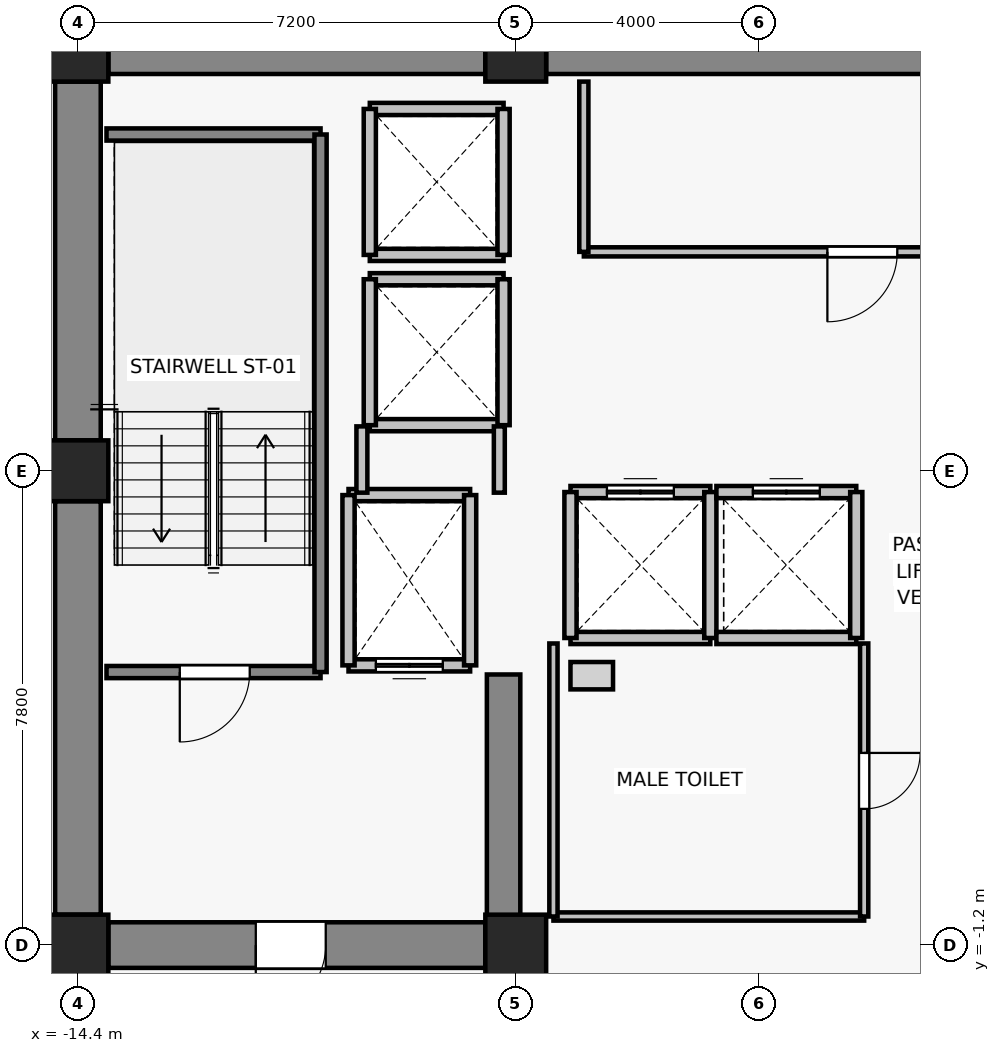
"""IFC4 building model, lengths in metres.
Left out: names, types, materials, properties, quantities, classifications, styles, units other than length and angle.
Written with IfcOpenShell. Run it as: python <this file> out.ifc"""

import sys

from ifc_helpers import new_model, si_unit, direction, frame, frame_2d, origin, origin_2d, place, context, subcontext, project, spatial, rectangle, extrude, source, transform, mapped, element, fill, save


model = new_model("IFC4")
c1 = context("Model", 3, precision=1e-05, world=origin(), true_north=direction((0.0, 1.0)))
c2 = subcontext(c1, "Body", "Model", "MODEL_VIEW")
j1 = project(units=[si_unit("LENGTHUNIT", "METRE"), si_unit("PLANEANGLEUNIT", "RADIAN")], contexts=[c1])
p1 = place(None, origin())
s1 = spatial("IfcSite", under=j1, at=p1, CompositionType="ELEMENT")
p2 = place(p1, origin())
s2 = spatial("IfcBuilding", under=s1, at=p2, CompositionType="ELEMENT")
p3 = place(p2, frame((0.0, 0.0, 169.3)))
s3 = spatial("IfcBuildingStorey", under=s2, at=p3, CompositionType="ELEMENT", Elevation=169.3)
for number, where, z_axis, x_axis in (
    (1, (-14.4, -1.2, 0.0), (0.0, 0.0, 1.0), (1.0, 0.0, 0.0)),
    (2, (-7.2, -1.2, 0.0), (0.0, 0.0, 1.0), (1.0, 0.0, 0.0)),
    (3, (-14.4, 6.6, 0.0), (0.0, 0.0, 1.0), (1.0, 0.0, 0.0)),
    (4, (-14.4, 13.5, 0.0), (0.0, 0.0, 1.0), (1.0, 0.0, 0.0)),
    (5, (-7.2, 13.5, 0.0), (0.0, 0.0, 1.0), (1.0, 0.0, 0.0)),
):
    element("IfcColumn", number, at=place(p3, frame(where, z_axis=z_axis, x_axis=x_axis)), inside=s3, PredefinedType="COLUMN", context=c2, shape_type="SweptSolid", body=[
        extrude(rectangle(XDim=1.0, YDim=1.0, at=origin_2d()), origin(), (0.0, 0.0, 1.0), 3.3),
    ])
p4 = place(p3, frame((-13.9, 13.5, 0.0), z_axis=(0.0, 0.0, 1.0), x_axis=(1.0, 0.0, 0.0)))
e6 = element("IfcWall", 6, at=p4, inside=s3, PredefinedType="SHEAR", context=c2, shape_type="SweptSolid", body=[
    extrude(rectangle(XDim=6.2, YDim=0.75, at=frame_2d((3.1, 0.0))), origin(), (0.0, 0.0, 1.0), 3.075),
])
p5 = place(p3, frame((-6.7, 13.5, 0.0), z_axis=(0.0, 0.0, 1.0), x_axis=(1.0, 0.0, 0.0)))
e7 = element("IfcWall", 7, at=p5, inside=s3, PredefinedType="SHEAR", context=c2, shape_type="SweptSolid", body=[
    extrude(rectangle(XDim=13.4, YDim=0.75, at=frame_2d((6.7, 0.0))), origin(), (0.0, 0.0, 1.0), 3.075),
])
p6 = place(p3, frame((-14.4, -0.7, 0.0), z_axis=(0.0, 0.0, 1.0), x_axis=(0.0, 1.0, 0.0)))
e8 = element("IfcWall", 8, at=p6, inside=s3, PredefinedType="SHEAR", context=c2, shape_type="SweptSolid", body=[
    extrude(rectangle(XDim=6.8, YDim=0.75, at=frame_2d((3.4, 0.0))), origin(), (0.0, 0.0, 1.0), 3.075),
])
p7 = place(p3, frame((-14.4, 7.1, 0.0), z_axis=(0.0, 0.0, 1.0), x_axis=(0.0, 1.0, 0.0)))
e9 = element("IfcWall", 9, at=p7, inside=s3, PredefinedType="SHEAR", context=c2, shape_type="SweptSolid", body=[
    extrude(rectangle(XDim=5.9, YDim=0.75, at=frame_2d((2.95, 0.0))), origin(), (0.0, 0.0, 1.0), 3.075),
])
p8 = place(p3, frame((-7.7, -1.2, 0.0), z_axis=(0.0, 0.0, 1.0), x_axis=(-1.0, 0.0, 0.0)))
e10 = element("IfcWall", 10, at=p8, inside=s3, PredefinedType="SHEAR", context=c2, shape_type="SweptSolid", body=[
    extrude(rectangle(XDim=6.2, YDim=0.75, at=frame_2d((3.1, 0.0))), origin(), (0.0, 0.0, 1.0), 3.075),
])
p9 = place(p8, frame((2.625, 0.0, 0.0)))
e11 = element("IfcOpeningElement", 11, at=p9, cuts=e10, PredefinedType="OPENING", context=c2, shape_type="SweptSolid", body=[
    extrude(rectangle(XDim=1.15, YDim=2.15, at=frame_2d((0.575, 1.075))), frame((0.0, 0.385, 0.0), z_axis=(0.0, -1.0, 0.0), x_axis=(1.0, 0.0, 0.0)), (0.0, 0.0, 1.0), 0.77),
])
p10 = place(p3, frame((-7.4, -0.825, 0.0), z_axis=(0.0, 0.0, 1.0), x_axis=(0.0, 1.0, 0.0)))
e12 = element("IfcWall", 12, at=p10, inside=s3, PredefinedType="SHEAR", context=c2, shape_type="SweptSolid", body=[
    extrude(rectangle(XDim=4.075, YDim=0.55, at=frame_2d((2.038, 0.0))), origin(), (0.0, 0.0, 1.0), 3.075),
])
p11 = place(p3, frame((-7.95, 3.4, 0.0), z_axis=(0.0, 0.0, 1.0), x_axis=(-1.0, 0.0, 0.0)))
e13 = element("IfcWall", 13, at=p11, inside=s3, PredefinedType="SOLIDWALL", context=c2, shape_type="SweptSolid", body=[
    extrude(rectangle(XDim=2.0, YDim=0.2, at=frame_2d((1.0, 0.0))), origin(), (0.0, 0.0, 1.0), 3.075),
])
p12 = place(p11, frame((0.45, 0.0, 0.0)))
e14 = element("IfcOpeningElement", 14, at=p12, cuts=e13, PredefinedType="OPENING", context=c2, shape_type="SweptSolid", body=[
    extrude(rectangle(XDim=1.1, YDim=2.2, at=frame_2d((0.55, 1.1))), frame((0.0, 0.11, 0.0), z_axis=(0.0, -1.0, 0.0), x_axis=(1.0, 0.0, 0.0)), (0.0, 0.0, 1.0), 0.22),
])
p13 = place(p3, frame((-9.95, 6.2, 0.0), z_axis=(0.0, 0.0, 1.0), x_axis=(1.0, 0.0, 0.0)))
e15 = element("IfcWall", 15, at=p13, inside=s3, PredefinedType="SOLIDWALL", context=c2, shape_type="SweptSolid", body=[
    extrude(rectangle(XDim=2.0, YDim=0.2, at=frame_2d((1.0, 0.0))), origin(), (0.0, 0.0, 1.0), 3.075),
])
for number, where, z_axis, x_axis in (
    (16, (-9.95, 3.4, 0.0), (0.0, 0.0, 1.0), (0.0, 1.0, 0.0)),
    (17, (-7.95, 6.2, 0.0), (0.0, 0.0, 1.0), (0.0, -1.0, 0.0)),
):
    element("IfcWall", number, at=place(p3, frame(where, z_axis=z_axis, x_axis=x_axis)), inside=s3, PredefinedType="SOLIDWALL", context=c2, shape_type="SweptSolid", body=[
        extrude(rectangle(XDim=2.8, YDim=0.2, at=frame_2d((1.4, 0.0))), origin(), (0.0, 0.0, 1.0), 3.075),
    ])
p14 = place(p3, frame((-4.0, 3.85, 0.0), z_axis=(0.0, 0.0, 1.0), x_axis=(-1.0, 0.0, 0.0)))
e18 = element("IfcWall", 18, at=p14, inside=s3, PredefinedType="SOLIDWALL", context=c2, shape_type="SweptSolid", body=[
    extrude(rectangle(XDim=2.3, YDim=0.2, at=frame_2d((1.15, 0.0))), origin(), (0.0, 0.0, 1.0), 3.075),
])
p15 = place(p3, frame((-6.3, 6.25, 0.0), z_axis=(0.0, 0.0, 1.0), x_axis=(1.0, 0.0, 0.0)))
e19 = element("IfcWall", 19, at=p15, inside=s3, PredefinedType="SOLIDWALL", context=c2, shape_type="SweptSolid", body=[
    extrude(rectangle(XDim=2.3, YDim=0.2, at=frame_2d((1.15, 0.0))), origin(), (0.0, 0.0, 1.0), 3.075),
])
p16 = place(p15, frame((0.6, 0.0, 0.0)))
e20 = element("IfcOpeningElement", 20, at=p16, cuts=e19, PredefinedType="OPENING", context=c2, shape_type="SweptSolid", body=[
    extrude(rectangle(XDim=1.1, YDim=2.2, at=frame_2d((0.55, 1.1))), frame((0.0, 0.11, 0.0), z_axis=(0.0, -1.0, 0.0), x_axis=(1.0, 0.0, 0.0)), (0.0, 0.0, 1.0), 0.22),
])
for number, where, z_axis, x_axis in (
    (21, (-6.3, 3.85, 0.0), (0.0, 0.0, 1.0), (0.0, 1.0, 0.0)),
    (22, (-4.0, 6.25, 0.0), (0.0, 0.0, 1.0), (0.0, -1.0, 0.0)),
):
    element("IfcWall", number, at=place(p3, frame(where, z_axis=z_axis, x_axis=x_axis)), inside=s3, PredefinedType="SOLIDWALL", context=c2, shape_type="SweptSolid", body=[
        extrude(rectangle(XDim=2.4, YDim=0.2, at=frame_2d((1.2, 0.0))), origin(), (0.0, 0.0, 1.0), 3.075),
    ])
p17 = place(p3, frame((-1.6, 3.85, 0.0), z_axis=(0.0, 0.0, 1.0), x_axis=(-1.0, 0.0, 0.0)))
e23 = element("IfcWall", 23, at=p17, inside=s3, PredefinedType="SOLIDWALL", context=c2, shape_type="SweptSolid", body=[
    extrude(rectangle(XDim=2.3, YDim=0.2, at=frame_2d((1.15, 0.0))), origin(), (0.0, 0.0, 1.0), 3.075),
])
p18 = place(p3, frame((-3.9, 6.25, 0.0), z_axis=(0.0, 0.0, 1.0), x_axis=(1.0, 0.0, 0.0)))
e24 = element("IfcWall", 24, at=p18, inside=s3, PredefinedType="SOLIDWALL", context=c2, shape_type="SweptSolid", body=[
    extrude(rectangle(XDim=2.3, YDim=0.2, at=frame_2d((1.15, 0.0))), origin(), (0.0, 0.0, 1.0), 3.075),
])
p19 = place(p18, frame((0.6, 0.0, 0.0)))
e25 = element("IfcOpeningElement", 25, at=p19, cuts=e24, PredefinedType="OPENING", context=c2, shape_type="SweptSolid", body=[
    extrude(rectangle(XDim=1.1, YDim=2.2, at=frame_2d((0.55, 1.1))), frame((0.0, 0.11, 0.0), z_axis=(0.0, -1.0, 0.0), x_axis=(1.0, 0.0, 0.0)), (0.0, 0.0, 1.0), 0.22),
])
p20 = place(p3, frame((-1.6, 6.25, 0.0), z_axis=(0.0, 0.0, 1.0), x_axis=(0.0, -1.0, 0.0)))
e26 = element("IfcWall", 26, at=p20, inside=s3, PredefinedType="SOLIDWALL", context=c2, shape_type="SweptSolid", body=[
    extrude(rectangle(XDim=2.4, YDim=0.2, at=frame_2d((1.2, 0.0))), origin(), (0.0, 0.0, 1.0), 3.075),
])
for number, where, z_axis, x_axis in (
    (27, (-7.4, 7.35, 0.0), (0.0, 0.0, 1.0), (-1.0, 0.0, 0.0)),
    (28, (-9.6, 9.75, 0.0), (0.0, 0.0, 1.0), (1.0, 0.0, 0.0)),
):
    element("IfcWall", number, at=place(p3, frame(where, z_axis=z_axis, x_axis=x_axis)), inside=s3, PredefinedType="SOLIDWALL", context=c2, shape_type="SweptSolid", body=[
        extrude(rectangle(XDim=2.2, YDim=0.2, at=frame_2d((1.1, 0.0))), origin(), (0.0, 0.0, 1.0), 2.565),
    ])
p21 = place(p3, frame((-9.6, 7.35, 0.0), z_axis=(0.0, 0.0, 1.0), x_axis=(0.0, 1.0, 0.0)))
e29 = element("IfcWall", 29, at=p21, inside=s3, PredefinedType="SOLIDWALL", context=c2, shape_type="SweptSolid", body=[
    extrude(rectangle(XDim=2.4, YDim=0.2, at=frame_2d((1.2, 0.0))), origin(), (0.0, 0.0, 1.0), 3.075),
])
p22 = place(p3, frame((-7.4, 9.75, 0.0), z_axis=(0.0, 0.0, 1.0), x_axis=(0.0, -1.0, 0.0)))
e30 = element("IfcWall", 30, at=p22, inside=s3, PredefinedType="SOLIDWALL", context=c2, shape_type="SweptSolid", body=[
    extrude(rectangle(XDim=2.4, YDim=0.2, at=frame_2d((1.2, 0.0))), origin(), (0.0, 0.0, 1.0), 2.565),
])
for number, where, z_axis, x_axis in (
    (31, (-7.4, 10.15, 0.0), (0.0, 0.0, 1.0), (-1.0, 0.0, 0.0)),
    (32, (-9.6, 12.55, 0.0), (0.0, 0.0, 1.0), (1.0, 0.0, 0.0)),
):
    element("IfcWall", number, at=place(p3, frame(where, z_axis=z_axis, x_axis=x_axis)), inside=s3, PredefinedType="SOLIDWALL", context=c2, shape_type="SweptSolid", body=[
        extrude(rectangle(XDim=2.2, YDim=0.2, at=frame_2d((1.1, 0.0))), origin(), (0.0, 0.0, 1.0), 2.565),
    ])
p23 = place(p3, frame((-9.6, 10.15, 0.0), z_axis=(0.0, 0.0, 1.0), x_axis=(0.0, 1.0, 0.0)))
e33 = element("IfcWall", 33, at=p23, inside=s3, PredefinedType="SOLIDWALL", context=c2, shape_type="SweptSolid", body=[
    extrude(rectangle(XDim=2.4, YDim=0.2, at=frame_2d((1.2, 0.0))), origin(), (0.0, 0.0, 1.0), 3.075),
])
p24 = place(p3, frame((-7.4, 12.55, 0.0), z_axis=(0.0, 0.0, 1.0), x_axis=(0.0, -1.0, 0.0)))
e34 = element("IfcWall", 34, at=p24, inside=s3, PredefinedType="SOLIDWALL", context=c2, shape_type="SweptSolid", body=[
    extrude(rectangle(XDim=2.4, YDim=0.2, at=frame_2d((1.2, 0.0))), origin(), (0.0, 0.0, 1.0), 2.565),
])
p25 = place(p3, frame((-10.41, 3.29, 0.0), z_axis=(0.0, 0.0, 1.0), x_axis=(-1.0, 0.0, 0.0)))
e35 = element("IfcWall", 35, at=p25, inside=s3, PredefinedType="SOLIDWALL", context=c2, shape_type="SweptSolid", body=[
    extrude(rectangle(XDim=3.52, YDim=0.2, at=frame_2d((1.76, 0.0))), origin(), (0.0, 0.0, 1.0), 3.075),
])
p26 = place(p25, frame((1.165, 0.0, 0.0)))
e36 = element("IfcOpeningElement", 36, at=p26, cuts=e35, PredefinedType="OPENING", context=c2, shape_type="SweptSolid", body=[
    extrude(rectangle(XDim=1.15, YDim=2.15, at=frame_2d((0.575, 1.075))), frame((0.0, 0.11, 0.0), z_axis=(0.0, -1.0, 0.0), x_axis=(1.0, 0.0, 0.0)), (0.0, 0.0, 1.0), 0.22),
])
p27 = place(p3, frame((-13.93, 12.13, 0.0), z_axis=(0.0, 0.0, 1.0), x_axis=(1.0, 0.0, 0.0)))
e37 = element("IfcWall", 37, at=p27, inside=s3, PredefinedType="SOLIDWALL", context=c2, shape_type="SweptSolid", body=[
    extrude(rectangle(XDim=3.52, YDim=0.2, at=frame_2d((1.76, 0.0))), origin(), (0.0, 0.0, 1.0), 3.075),
])
p28 = place(p3, frame((-10.41, 12.13, 0.0), z_axis=(0.0, 0.0, 1.0), x_axis=(0.0, -1.0, 0.0)))
e38 = element("IfcWall", 38, at=p28, inside=s3, PredefinedType="SOLIDWALL", context=c2, shape_type="SweptSolid", body=[
    extrude(rectangle(XDim=8.84, YDim=0.2, at=frame_2d((4.42, 0.0))), origin(), (0.0, 0.0, 1.0), 3.075),
])
p29 = place(p3, frame((-9.73, 6.24, 0.0), z_axis=(0.0, 0.0, 1.0), x_axis=(0.0, 1.0, 0.0)))
e39 = element("IfcWall", 39, at=p29, inside=s3, PredefinedType="PARTITIONING", context=c2, shape_type="SweptSolid", body=[
    extrude(rectangle(XDim=1.09, YDim=0.18, at=frame_2d((0.545, 0.0))), origin(), (0.0, 0.0, 1.0), 3.075),
])
p30 = place(p3, frame((-7.47, 7.33, 0.0), z_axis=(0.0, 0.0, 1.0), x_axis=(0.0, -1.0, 0.0)))
e40 = element("IfcWall", 40, at=p30, inside=s3, PredefinedType="PARTITIONING", context=c2, shape_type="SweptSolid", body=[
    extrude(rectangle(XDim=1.09, YDim=0.18, at=frame_2d((0.545, 0.0))), origin(), (0.0, 0.0, 1.0), 2.565),
])
p31 = place(p3, frame((6.08, 10.2, 0.0), z_axis=(0.0, 0.0, 1.0), x_axis=(-1.0, 0.0, 0.0)))
e41 = element("IfcWall", 41, at=p31, inside=s3, PredefinedType="PARTITIONING", context=c2, shape_type="SweptSolid", body=[
    extrude(rectangle(XDim=12.16, YDim=0.15, at=frame_2d((6.08, 0.0))), origin(), (0.0, 0.0, 1.0), 3.075),
])
p32 = place(p31, frame((7.005, 0.0, 0.0)))
e42 = element("IfcOpeningElement", 42, at=p32, cuts=e41, PredefinedType="OPENING", context=c2, shape_type="SweptSolid", body=[
    extrude(rectangle(XDim=1.15, YDim=2.15, at=frame_2d((0.575, 1.075))), frame((0.0, 0.085, 0.0), z_axis=(0.0, -1.0, 0.0), x_axis=(1.0, 0.0, 0.0)), (0.0, 0.0, 1.0), 0.17),
])
p33 = place(p3, frame((-6.08, 10.2, 0.0), z_axis=(0.0, 0.0, 1.0), x_axis=(0.0, 1.0, 0.0)))
e43 = element("IfcWall", 43, at=p33, inside=s3, PredefinedType="PARTITIONING", context=c2, shape_type="SweptSolid", body=[
    extrude(rectangle(XDim=2.8, YDim=0.15, at=frame_2d((1.4, 0.0))), origin(), (0.0, 0.0, 1.0), 3.075),
])
p34 = place(p3, frame((-1.47, -0.73, 0.0), z_axis=(0.0, 0.0, 1.0), x_axis=(-1.0, 0.0, 0.0)))
e44 = element("IfcWall", 44, at=p34, inside=s3, PredefinedType="PARTITIONING", context=c2, shape_type="SweptSolid", body=[
    extrude(rectangle(XDim=5.11, YDim=0.135, at=frame_2d((2.555, 0.0))), origin(), (0.0, 0.0, 1.0), 3.075),
])
p35 = place(p3, frame((-6.58, -0.73, 0.0), z_axis=(0.0, 0.0, 1.0), x_axis=(0.0, 1.0, 0.0)))
e45 = element("IfcWall", 45, at=p35, inside=s3, PredefinedType="PARTITIONING", context=c2, shape_type="SweptSolid", body=[
    extrude(rectangle(XDim=4.49, YDim=0.135, at=frame_2d((2.245, 0.0))), origin(), (0.0, 0.0, 1.0), 3.075),
])
p36 = place(p3, frame((-1.47, 3.76, 0.0), z_axis=(0.0, 0.0, 1.0), x_axis=(0.0, -1.0, 0.0)))
e46 = element("IfcWall", 46, at=p36, inside=s3, PredefinedType="PARTITIONING", context=c2, shape_type="SweptSolid", body=[
    extrude(rectangle(XDim=4.49, YDim=0.135, at=frame_2d((2.245, 0.0))), origin(), (0.0, 0.0, 1.0), 3.075),
])
p37 = place(p36, frame((1.8, 0.0, 0.0)))
e47 = element("IfcOpeningElement", 47, at=p37, cuts=e46, PredefinedType="OPENING", context=c2, shape_type="SweptSolid", body=[
    extrude(rectangle(XDim=0.92, YDim=2.1, at=frame_2d((0.46, 1.05))), frame((0.0, 0.077, 0.0), z_axis=(0.0, -1.0, 0.0), x_axis=(1.0, 0.0, 0.0)), (0.0, 0.0, 1.0), 0.155),
])
m1 = source(origin(), c2, "Body", "SweptSolid", [
    extrude(rectangle(XDim=1.1, YDim=2.2, at=frame_2d((0.55, 1.1))), frame((0.0, 0.025, 0.0), z_axis=(0.0, -1.0, 0.0), x_axis=(1.0, 0.0, 0.0)), (0.0, 0.0, 1.0), 0.05),
])
p38 = place(p12, origin())
e48 = element("IfcDoor", 48, at=p38, inside=s3, OperationType="DOUBLE_DOOR_SLIDING", PredefinedType="DOOR", context=c2, shape_type="MappedRepresentation", body=[
    mapped(m1, transform((0.0, 0.0, 0.0), x_axis=(1.0, 0.0, 0.0), y_axis=(0.0, 1.0, 0.0), z_axis=(0.0, 0.0, 1.0), scale=1.0)),
])
fill(e14, e48)
p39 = place(p16, origin())
e49 = element("IfcDoor", 49, at=p39, inside=s3, OperationType="DOUBLE_DOOR_SLIDING", PredefinedType="DOOR", context=c2, shape_type="MappedRepresentation", body=[
    mapped(m1, transform((0.0, 0.0, 0.0), x_axis=(1.0, 0.0, 0.0), y_axis=(0.0, 1.0, 0.0), z_axis=(0.0, 0.0, 1.0), scale=1.0)),
])
fill(e20, e49)
p40 = place(p19, origin())
e50 = element("IfcDoor", 50, at=p40, inside=s3, OperationType="DOUBLE_DOOR_SLIDING", PredefinedType="DOOR", context=c2, shape_type="MappedRepresentation", body=[
    mapped(m1, transform((0.0, 0.0, 0.0), x_axis=(1.0, 0.0, 0.0), y_axis=(0.0, 1.0, 0.0), z_axis=(0.0, 0.0, 1.0), scale=1.0)),
])
fill(e25, e50)
m2 = source(origin(), c2, "Body", "SweptSolid", [
    extrude(rectangle(XDim=1.15, YDim=2.15, at=frame_2d((0.575, 1.075))), frame((0.0, 0.025, 0.0), z_axis=(0.0, -1.0, 0.0), x_axis=(1.0, 0.0, 0.0)), (0.0, 0.0, 1.0), 0.05),
])
p41 = place(p26, origin())
e51 = element("IfcDoor", 51, at=p41, inside=s3, OperationType="SINGLE_SWING_RIGHT", PredefinedType="DOOR", context=c2, shape_type="MappedRepresentation", body=[
    mapped(m2, transform((0.0, 0.0, 0.0), x_axis=(1.0, 0.0, 0.0), y_axis=(0.0, 1.0, 0.0), z_axis=(0.0, 0.0, 1.0), scale=1.0)),
])
fill(e36, e51)
p42 = place(p9, origin())
e52 = element("IfcDoor", 52, at=p42, inside=s3, OperationType="SINGLE_SWING_RIGHT", PredefinedType="DOOR", context=c2, shape_type="MappedRepresentation", body=[
    mapped(m2, transform((0.0, 0.0, 0.0), x_axis=(1.0, 0.0, 0.0), y_axis=(0.0, 1.0, 0.0), z_axis=(0.0, 0.0, 1.0), scale=1.0)),
])
fill(e11, e52)
p43 = place(p32, origin())
e53 = element("IfcDoor", 53, at=p43, inside=s3, OperationType="SINGLE_SWING_RIGHT", PredefinedType="DOOR", context=c2, shape_type="MappedRepresentation", body=[
    mapped(m2, transform((0.0, 0.0, 0.0), x_axis=(1.0, 0.0, 0.0), y_axis=(0.0, 1.0, 0.0), z_axis=(0.0, 0.0, 1.0), scale=1.0)),
])
fill(e42, e53)
m3 = source(origin(), c2, "Body", "SweptSolid", [
    extrude(rectangle(XDim=0.92, YDim=2.1, at=frame_2d((0.46, 1.05))), frame((0.0, 0.025, 0.0), z_axis=(0.0, -1.0, 0.0), x_axis=(1.0, 0.0, 0.0)), (0.0, 0.0, 1.0), 0.05),
])
p44 = place(p37, origin())
e54 = element("IfcDoor", 54, at=p44, inside=s3, OperationType="SINGLE_SWING_LEFT", PredefinedType="DOOR", context=c2, shape_type="MappedRepresentation", body=[
    mapped(m3, transform((0.0, 0.0, 0.0), x_axis=(1.0, 0.0, 0.0), y_axis=(0.0, 1.0, 0.0), z_axis=(0.0, 0.0, 1.0), scale=1.0)),
])
fill(e47, e54)
save(model, sys.argv[1])
